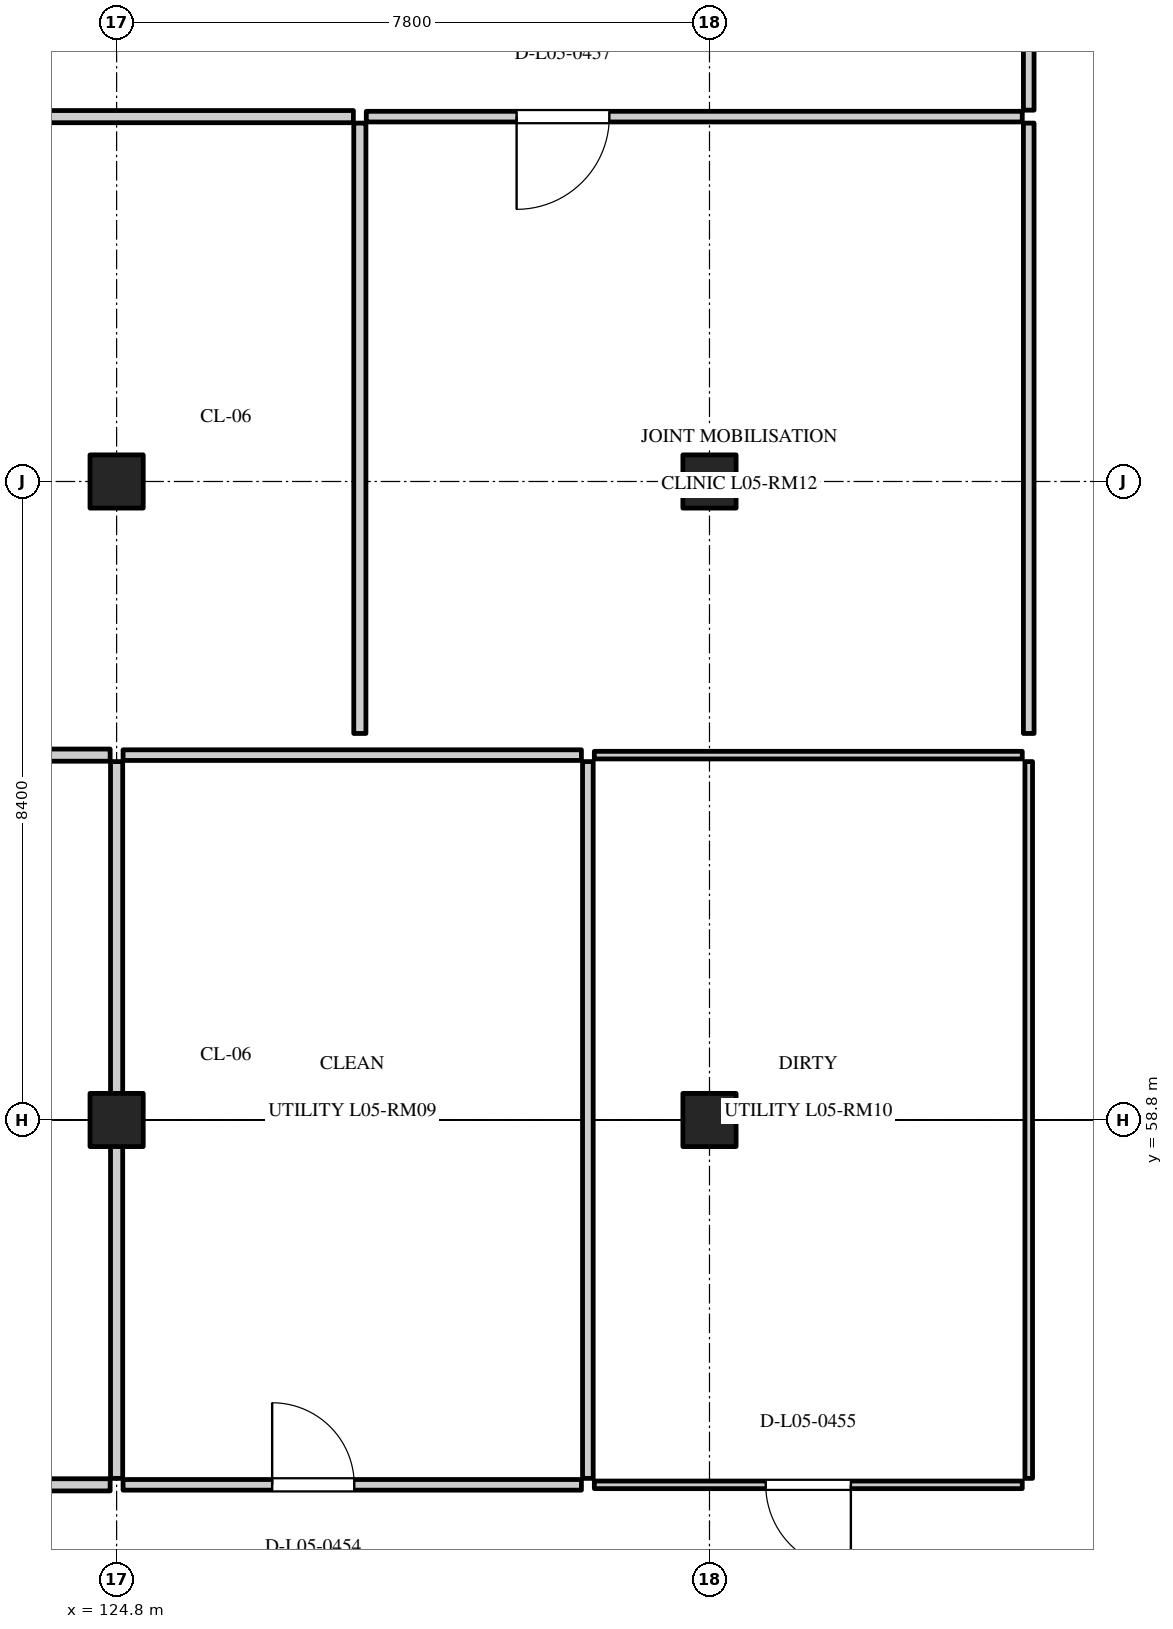
"""IFC4 building model, lengths in metres.
Left out: names, types, materials, properties, quantities, classifications, styles, units other than length and angle.
Written with IfcOpenShell. Run it as: python <this file> out.ifc"""

import sys

from ifc_helpers import new_model, si_unit, direction, frame, frame_2d, origin, origin_2d, place, context, subcontext, project, spatial, rectangle, extrude, element, fill, save


model = new_model("IFC4")
c1 = context("Model", 3, precision=1e-05, world=origin(), true_north=direction((0.0, 1.0)))
c2 = subcontext(c1, "Body", "Model", "MODEL_VIEW")
j1 = project(units=[si_unit("LENGTHUNIT", "METRE"), si_unit("PLANEANGLEUNIT", "RADIAN")], contexts=[c1])
p1 = place(None, origin())
s1 = spatial("IfcSite", under=j1, at=p1, CompositionType="ELEMENT")
p2 = place(p1, origin())
s2 = spatial("IfcBuilding", under=s1, at=p2, CompositionType="ELEMENT")
p3 = place(p2, frame((0.0, 0.0, 22.2)))
s3 = spatial("IfcBuildingStorey", under=s2, at=p3, CompositionType="ELEMENT", Elevation=22.2)
for number, where, z_axis, x_axis in (
    (1, (124.8, 58.8, 0.0), (0.0, 0.0, 1.0), (1.0, 0.0, 0.0)),
    (2, (124.8, 67.2, 0.0), (0.0, 0.0, 1.0), (1.0, 0.0, 0.0)),
    (3, (132.6, 58.8, 0.0), (0.0, 0.0, 1.0), (1.0, 0.0, 0.0)),
    (4, (132.6, 67.2, 0.0), (0.0, 0.0, 1.0), (1.0, 0.0, 0.0)),
):
    element("IfcColumn", number, at=place(p3, frame(where, z_axis=z_axis, x_axis=x_axis)), inside=s3, PredefinedType="COLUMN", context=c2, shape_type="SweptSolid", body=[
        extrude(rectangle(XDim=0.7, YDim=0.7, at=origin_2d()), origin(), (0.0, 0.0, 1.0), 3.9),
    ])
p4 = place(p3, frame((113.285, 54.0, 0.0), z_axis=(0.0, 0.0, 1.0), x_axis=(1.0, 0.0, 0.0)))
e5 = element("IfcWall", 5, at=p4, inside=s3, PredefinedType="PARTITIONING", context=c2, shape_type="SweptSolid", body=[
    extrude(rectangle(XDim=11.43, YDim=0.16, at=frame_2d((5.715, 0.0))), origin(), (0.0, 0.0, 1.0), 3.58),
])
p5 = place(p4, frame((1.953, 0.0, 0.0)))
e6 = element("IfcOpeningElement", 6, at=p5, cuts=e5, PredefinedType="OPENING", context=c2, shape_type="SweptSolid", body=[
    extrude(rectangle(XDim=1.08, YDim=2.15, at=frame_2d((0.54, 1.075))), frame((0.0, 0.092, 0.0), z_axis=(0.0, -1.0, 0.0), x_axis=(1.0, 0.0, 0.0)), (0.0, 0.0, 1.0), 0.184),
])
p6 = place(p3, frame((113.285, 63.6, 0.0), z_axis=(0.0, 0.0, 1.0), x_axis=(1.0, 0.0, 0.0)))
e7 = element("IfcWall", 7, at=p6, inside=s3, PredefinedType="PARTITIONING", context=c2, shape_type="SweptSolid", body=[
    extrude(rectangle(XDim=11.43, YDim=0.16, at=frame_2d((5.715, 0.0))), origin(), (0.0, 0.0, 1.0), 3.58),
])
p7 = place(p3, frame((124.8, 54.085, 0.0), z_axis=(0.0, 0.0, 1.0), x_axis=(0.0, 1.0, 0.0)))
e8 = element("IfcWall", 8, at=p7, inside=s3, PredefinedType="PARTITIONING", context=c2, shape_type="SweptSolid", body=[
    extrude(rectangle(XDim=9.43, YDim=0.16, at=frame_2d((4.715, 0.0))), origin(), (0.0, 0.0, 1.0), 3.58),
])
p8 = place(p3, frame((124.885, 54.0, 0.0), z_axis=(0.0, 0.0, 1.0), x_axis=(1.0, 0.0, 0.0)))
e9 = element("IfcWall", 9, at=p8, inside=s3, PredefinedType="PARTITIONING", context=c2, shape_type="SweptSolid", body=[
    extrude(rectangle(XDim=6.03, YDim=0.14, at=frame_2d((3.015, 0.0))), origin(), (0.0, 0.0, 1.0), 3.58),
])
p9 = place(p8, frame((1.961, 0.0, 0.0)))
e10 = element("IfcOpeningElement", 10, at=p9, cuts=e9, PredefinedType="OPENING", context=c2, shape_type="SweptSolid", body=[
    extrude(rectangle(XDim=1.08, YDim=2.15, at=frame_2d((0.54, 1.075))), frame((0.0, 0.082, 0.0), z_axis=(0.0, -1.0, 0.0), x_axis=(1.0, 0.0, 0.0)), (0.0, 0.0, 1.0), 0.164),
])
p10 = place(p3, frame((124.885, 63.6, 0.0), z_axis=(0.0, 0.0, 1.0), x_axis=(1.0, 0.0, 0.0)))
e11 = element("IfcWall", 11, at=p10, inside=s3, PredefinedType="PARTITIONING", context=c2, shape_type="SweptSolid", body=[
    extrude(rectangle(XDim=6.03, YDim=0.14, at=frame_2d((3.015, 0.0))), origin(), (0.0, 0.0, 1.0), 3.58),
])
p11 = place(p3, frame((131.0, 54.085, 0.0), z_axis=(0.0, 0.0, 1.0), x_axis=(0.0, 1.0, 0.0)))
e12 = element("IfcWall", 12, at=p11, inside=s3, PredefinedType="PARTITIONING", context=c2, shape_type="SweptSolid", body=[
    extrude(rectangle(XDim=9.43, YDim=0.14, at=frame_2d((4.715, 0.0))), origin(), (0.0, 0.0, 1.0), 3.58),
])
p12 = place(p3, frame((131.085, 54.0, 0.0), z_axis=(0.0, 0.0, 1.0), x_axis=(1.0, 0.0, 0.0)))
e13 = element("IfcWall", 13, at=p12, inside=s3, PredefinedType="PARTITIONING", context=c2, shape_type="SweptSolid", body=[
    extrude(rectangle(XDim=5.63, YDim=0.1, at=frame_2d((2.815, 0.0))), origin(), (0.0, 0.0, 1.0), 3.58),
])
p13 = place(p12, frame((2.255, 0.0, 0.0)))
e14 = element("IfcOpeningElement", 14, at=p13, cuts=e13, PredefinedType="OPENING", context=c2, shape_type="SweptSolid", body=[
    extrude(rectangle(XDim=1.12, YDim=2.2, at=frame_2d((0.56, 1.1))), frame((0.0, 0.062, 0.0), z_axis=(0.0, -1.0, 0.0), x_axis=(1.0, 0.0, 0.0)), (0.0, 0.0, 1.0), 0.124),
])
p14 = place(p3, frame((131.085, 63.6, 0.0), z_axis=(0.0, 0.0, 1.0), x_axis=(1.0, 0.0, 0.0)))
e15 = element("IfcWall", 15, at=p14, inside=s3, PredefinedType="PARTITIONING", context=c2, shape_type="SweptSolid", body=[
    extrude(rectangle(XDim=5.63, YDim=0.1, at=frame_2d((2.815, 0.0))), origin(), (0.0, 0.0, 1.0), 3.58),
])
p15 = place(p3, frame((136.8, 54.085, 0.0), z_axis=(0.0, 0.0, 1.0), x_axis=(0.0, 1.0, 0.0)))
e16 = element("IfcWall", 16, at=p15, inside=s3, PredefinedType="PARTITIONING", context=c2, shape_type="SweptSolid", body=[
    extrude(rectangle(XDim=9.43, YDim=0.1, at=frame_2d((4.715, 0.0))), origin(), (0.0, 0.0, 1.0), 3.58),
])
p16 = place(p3, frame((113.285, 72.0, 0.0), z_axis=(0.0, 0.0, 1.0), x_axis=(1.0, 0.0, 0.0)))
e17 = element("IfcWall", 17, at=p16, inside=s3, PredefinedType="PARTITIONING", context=c2, shape_type="SweptSolid", body=[
    extrude(rectangle(XDim=14.63, YDim=0.16, at=frame_2d((7.315, 0.0))), origin(), (0.0, 0.0, 1.0), 3.58),
])
p17 = place(p16, frame((1.954, 0.0, 0.0)))
e18 = element("IfcOpeningElement", 18, at=p17, cuts=e17, PredefinedType="OPENING", context=c2, shape_type="SweptSolid", body=[
    extrude(rectangle(XDim=1.12, YDim=2.2, at=frame_2d((0.56, 1.1))), frame((0.0, 0.092, 0.0), z_axis=(0.0, -1.0, 0.0), x_axis=(1.0, 0.0, 0.0)), (0.0, 0.0, 1.0), 0.184),
])
p18 = place(p3, frame((128.0, 63.885, 0.0), z_axis=(0.0, 0.0, 1.0), x_axis=(0.0, 1.0, 0.0)))
e19 = element("IfcWall", 19, at=p18, inside=s3, PredefinedType="PARTITIONING", context=c2, shape_type="SweptSolid", body=[
    extrude(rectangle(XDim=8.03, YDim=0.16, at=frame_2d((4.015, 0.0))), origin(), (0.0, 0.0, 1.0), 3.58),
])
p19 = place(p3, frame((128.085, 72.0, 0.0), z_axis=(0.0, 0.0, 1.0), x_axis=(1.0, 0.0, 0.0)))
e20 = element("IfcWall", 20, at=p19, inside=s3, PredefinedType="PARTITIONING", context=c2, shape_type="SweptSolid", body=[
    extrude(rectangle(XDim=8.63, YDim=0.14, at=frame_2d((4.315, 0.0))), origin(), (0.0, 0.0, 1.0), 3.58),
])
p20 = place(p19, frame((1.978, 0.0, 0.0)))
e21 = element("IfcOpeningElement", 21, at=p20, cuts=e20, PredefinedType="OPENING", context=c2, shape_type="SweptSolid", body=[
    extrude(rectangle(XDim=1.22, YDim=2.15, at=frame_2d((0.61, 1.075))), frame((0.0, 0.082, 0.0), z_axis=(0.0, -1.0, 0.0), x_axis=(1.0, 0.0, 0.0)), (0.0, 0.0, 1.0), 0.164),
])
p21 = place(p3, frame((136.8, 63.885, 0.0), z_axis=(0.0, 0.0, 1.0), x_axis=(0.0, 1.0, 0.0)))
e22 = element("IfcWall", 22, at=p21, inside=s3, PredefinedType="PARTITIONING", context=c2, shape_type="SweptSolid", body=[
    extrude(rectangle(XDim=8.03, YDim=0.14, at=frame_2d((4.015, 0.0))), origin(), (0.0, 0.0, 1.0), 3.58),
])
p22 = place(p3, frame((136.8, 72.085, 0.0), z_axis=(0.0, 0.0, 1.0), x_axis=(0.0, 1.0, 0.0)))
e23 = element("IfcWall", 23, at=p22, inside=s3, PredefinedType="PARTITIONING", context=c2, shape_type="SweptSolid", body=[
    extrude(rectangle(XDim=3.23, YDim=0.14, at=frame_2d((1.615, 0.0))), origin(), (0.0, 0.0, 1.0), 3.58),
])
p23 = place(p9, origin())
e24 = element("IfcDoor", 24, at=p23, inside=s3, OperationType="SINGLE_SWING_LEFT", PredefinedType="DOOR", context=c2, shape_type="SweptSolid", body=[
    extrude(rectangle(XDim=1.08, YDim=2.15, at=frame_2d((0.54, 1.075))), frame((0.0, 0.025, 0.0), z_axis=(0.0, -1.0, 0.0), x_axis=(1.0, 0.0, 0.0)), (0.0, 0.0, 1.0), 0.05),
])
fill(e10, e24)
p24 = place(p13, origin())
e25 = element("IfcDoor", 25, at=p24, inside=s3, OperationType="SINGLE_SWING_RIGHT", PredefinedType="DOOR", context=c2, shape_type="SweptSolid", body=[
    extrude(rectangle(XDim=1.12, YDim=2.2, at=frame_2d((0.56, 1.1))), frame((0.0, 0.025, 0.0), z_axis=(0.0, -1.0, 0.0), x_axis=(1.0, 0.0, 0.0)), (0.0, 0.0, 1.0), 0.05),
])
fill(e14, e25)
p25 = place(p20, frame((1.22, 0.0, 0.0), z_axis=(0.0, 0.0, 1.0), x_axis=(-1.0, 0.0, 0.0)))
e26 = element("IfcDoor", 26, at=p25, inside=s3, OperationType="SINGLE_SWING_RIGHT", PredefinedType="DOOR", context=c2, shape_type="SweptSolid", body=[
    extrude(rectangle(XDim=1.22, YDim=2.15, at=frame_2d((0.61, 1.075))), frame((0.0, 0.025, 0.0), z_axis=(0.0, -1.0, 0.0), x_axis=(1.0, 0.0, 0.0)), (0.0, 0.0, 1.0), 0.05),
])
fill(e21, e26)
save(model, sys.argv[1])
